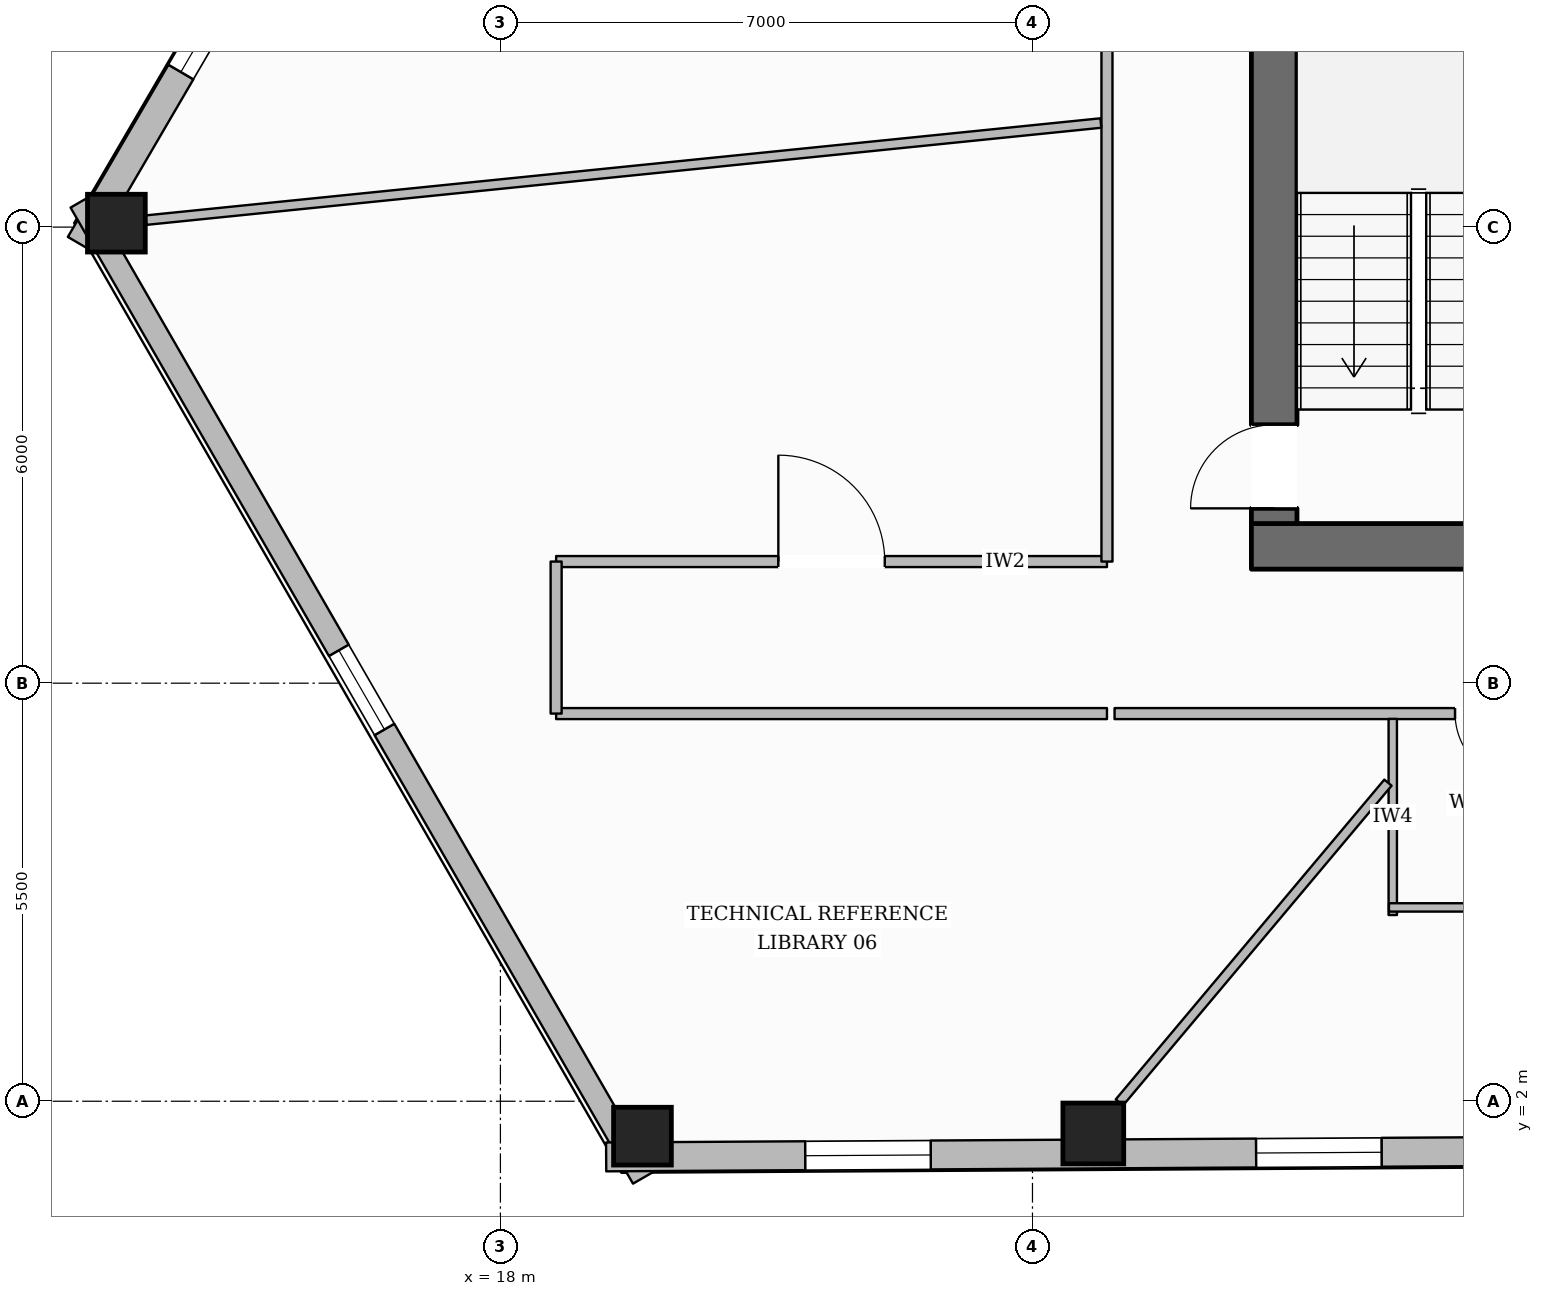
"""IFC4 building model, lengths in metres.
Left out: names, types, materials, properties, quantities, classifications, styles, units other than length and angle.
Written with IfcOpenShell. Run it as: python <this file> out.ifc"""

import sys

from ifc_helpers import new_model, si_unit, direction, frame, frame_2d, origin, origin_2d, place, context, subcontext, project, spatial, rectangle, hollow_rectangle, extrude, element, fill, save


model = new_model("IFC4")
c1 = context("Model", 3, precision=1e-05, world=origin(), true_north=direction((0.0, 1.0)))
c2 = subcontext(c1, "Body", "Model", "MODEL_VIEW")
j1 = project(units=[si_unit("LENGTHUNIT", "METRE"), si_unit("PLANEANGLEUNIT", "RADIAN")], contexts=[c1])
p1 = place(None, origin())
s1 = spatial("IfcSite", under=j1, at=p1, CompositionType="ELEMENT")
p2 = place(p1, origin())
s2 = spatial("IfcBuilding", under=s1, at=p2, CompositionType="ELEMENT")
p3 = place(p2, frame((0.0, 0.0, 71.45)))
s3 = spatial("IfcBuildingStorey", under=s2, at=p3, CompositionType="ELEMENT", Elevation=71.45)
p4 = place(p3, frame((27.88, 9.3, 0.0), z_axis=(0.0, 0.0, 1.0), x_axis=(1.0, 0.0, 0.0)))
e1 = element("IfcWall", 1, at=p4, inside=s3, PredefinedType="SOLIDWALL", context=c2, shape_type="SweptSolid", body=[
    extrude(rectangle(XDim=20.24, YDim=0.6, at=frame_2d((10.12, 0.0))), origin(), (0.0, 0.0, 1.0), 3.43),
])
p5 = place(p4, frame((10.62, 0.0, 0.0)))
e2 = element("IfcOpeningElement", 2, at=p5, cuts=e1, PredefinedType="OPENING", context=c2, shape_type="SweptSolid", body=[
    extrude(rectangle(XDim=1.4, YDim=2.2, at=frame_2d((0.7, 1.1))), frame((0.0, 0.31, 0.0), z_axis=(0.0, -1.0, 0.0), x_axis=(1.0, 0.0, 0.0)), (0.0, 0.0, 1.0), 0.62),
])
p6 = place(p3, frame((28.18, 9.6, 0.0), z_axis=(0.0, 0.0, 1.0), x_axis=(0.0, 1.0, 0.0)))
e3 = element("IfcWall", 3, at=p6, inside=s3, PredefinedType="SOLIDWALL", context=c2, shape_type="SweptSolid", body=[
    extrude(rectangle(XDim=13.0, YDim=0.6, at=frame_2d((6.5, 0.0))), origin(), (0.0, 0.0, 1.0), 3.43),
])
p7 = place(p6, frame((0.2, 0.0, 0.0)))
e4 = element("IfcOpeningElement", 4, at=p7, cuts=e3, PredefinedType="OPENING", context=c2, shape_type="SweptSolid", body=[
    extrude(rectangle(XDim=1.1, YDim=2.15, at=frame_2d((0.55, 1.075))), frame((0.0, 0.31, 0.0), z_axis=(0.0, -1.0, 0.0), x_axis=(1.0, 0.0, 0.0)), (0.0, 0.0, 1.0), 0.62),
])
p8 = place(p6, frame((8.4, 0.0, 0.0)))
e5 = element("IfcOpeningElement", 5, at=p8, cuts=e3, PredefinedType="OPENING", context=c2, shape_type="SweptSolid", body=[
    extrude(rectangle(XDim=0.9, YDim=2.1, at=frame_2d((0.45, 1.05))), frame((0.0, 0.31, 0.0), z_axis=(0.0, -1.0, 0.0), x_axis=(1.0, 0.0, 0.0)), (0.0, 0.0, 1.0), 0.62),
])
for number, where, z_axis, x_axis in (
    (6, (12.948, 13.552, 0.0), (0.0, 0.0, 1.0), (1.0, 0.0, 0.0)),
    (7, (19.869, 1.541, 0.0), (0.0, 0.0, 1.0), (1.0, 0.0, 0.0)),
):
    element("IfcColumn", number, at=place(p3, frame(where, z_axis=z_axis, x_axis=x_axis)), inside=s3, PredefinedType="COLUMN", context=c2, shape_type="SweptSolid", body=[
        extrude(hollow_rectangle(XDim=0.76, YDim=0.76, WallThickness=0.035, at=origin_2d()), origin(), (0.0, 0.0, 1.0), 3.43),
    ])
p9 = place(p3, frame((25.8, 1.576, 0.0), z_axis=(0.0, 0.0, 1.0), x_axis=(1.0, 0.0, 0.0)))
e8 = element("IfcColumn", 8, at=p9, inside=s3, PredefinedType="COLUMN", context=c2, shape_type="SweptSolid", body=[
    extrude(hollow_rectangle(XDim=0.8, YDim=0.8, WallThickness=0.036, at=origin_2d()), origin(), (0.0, 0.0, 1.0), 3.43),
])
p10 = place(p3, frame((12.473, 13.275, 0.0), z_axis=(0.0, 0.0, 1.0), x_axis=(0.504426765764, 0.863454479391, 0.0)))
e9 = element("IfcWall", 9, at=p10, inside=s3, PredefinedType="STANDARD", context=c2, shape_type="SweptSolid", body=[
    extrude(rectangle(XDim=36.594, YDim=0.38, at=frame_2d((18.297, 0.0))), origin(), (0.0, 0.0, 1.0), 2.81),
])
p11 = place(p10, frame((8.749, 0.0, 0.0)))
e10 = element("IfcOpeningElement", 10, at=p11, cuts=e9, PredefinedType="OPENING", context=c2, shape_type="SweptSolid", body=[
    extrude(rectangle(XDim=1.0, YDim=2.2, at=frame_2d((0.5, 1.1))), frame((0.0, 0.2, 0.0), z_axis=(0.0, -1.0, 0.0), x_axis=(1.0, 0.0, 0.0)), (0.0, 0.0, 1.0), 0.4),
])
p12 = place(p10, frame((32.326, 0.0, 0.55)))
e11 = element("IfcOpeningElement", 11, at=p12, cuts=e9, PredefinedType="OPENING", context=c2, shape_type="SweptSolid", body=[
    extrude(rectangle(XDim=1.65, YDim=1.6, at=frame_2d((0.825, 0.8))), frame((0.0, 0.2, 0.0), z_axis=(0.0, -1.0, 0.0), x_axis=(1.0, 0.0, 0.0)), (0.0, 0.0, 1.0), 0.4),
])
p13 = place(p10, frame((26.385, 0.0, 0.55)))
e12 = element("IfcOpeningElement", 12, at=p13, cuts=e9, PredefinedType="OPENING", context=c2, shape_type="SweptSolid", body=[
    extrude(rectangle(XDim=1.65, YDim=1.6, at=frame_2d((0.825, 0.8))), frame((0.0, 0.2, 0.0), z_axis=(0.0, -1.0, 0.0), x_axis=(1.0, 0.0, 0.0)), (0.0, 0.0, 1.0), 0.4),
])
p14 = place(p10, frame((20.445, 0.0, 0.55)))
e13 = element("IfcOpeningElement", 13, at=p14, cuts=e9, PredefinedType="OPENING", context=c2, shape_type="SweptSolid", body=[
    extrude(rectangle(XDim=1.65, YDim=1.6, at=frame_2d((0.825, 0.8))), frame((0.0, 0.2, 0.0), z_axis=(0.0, -1.0, 0.0), x_axis=(1.0, 0.0, 0.0)), (0.0, 0.0, 1.0), 0.4),
])
p15 = place(p10, frame((2.624, 0.0, 0.55)))
e14 = element("IfcOpeningElement", 14, at=p15, cuts=e9, PredefinedType="OPENING", context=c2, shape_type="SweptSolid", body=[
    extrude(rectangle(XDim=1.65, YDim=1.6, at=frame_2d((0.825, 0.8))), frame((0.0, 0.2, 0.0), z_axis=(0.0, -1.0, 0.0), x_axis=(1.0, 0.0, 0.0)), (0.0, 0.0, 1.0), 0.4),
])
p16 = place(p3, frame((19.874, 0.99, 0.0), z_axis=(0.0, 0.0, 1.0), x_axis=(-0.499265087694, 0.86644929004, 0.0)))
e15 = element("IfcWall", 15, at=p16, inside=s3, PredefinedType="STANDARD", context=c2, shape_type="SweptSolid", body=[
    extrude(rectangle(XDim=14.821, YDim=0.3, at=frame_2d((7.41, 0.0))), origin(), (0.0, 0.0, 1.0), 2.81),
])
p17 = place(p16, frame((6.81, 0.0, 0.65)))
e16 = element("IfcOpeningElement", 16, at=p17, cuts=e15, PredefinedType="OPENING", context=c2, shape_type="SweptSolid", body=[
    extrude(rectangle(XDim=1.2, YDim=1.55, at=frame_2d((0.6, 0.775))), frame((0.0, 0.16, 0.0), z_axis=(0.0, -1.0, 0.0), x_axis=(1.0, 0.0, 0.0)), (0.0, 0.0, 1.0), 0.32),
])
p18 = place(p3, frame((55.933, 1.486, 0.0), z_axis=(0.0, 0.0, 1.0), x_axis=(-0.999982241707, -0.005959552889, 0.0)))
e17 = element("IfcWall", 17, at=p18, inside=s3, PredefinedType="STANDARD", context=c2, shape_type="SweptSolid", body=[
    extrude(rectangle(XDim=36.542, YDim=0.38, at=frame_2d((18.271, 0.0))), origin(), (0.0, 0.0, 1.0), 2.81),
])
p19 = place(p18, frame((8.736, 0.0, 0.0)))
e18 = element("IfcOpeningElement", 18, at=p19, cuts=e17, PredefinedType="OPENING", context=c2, shape_type="SweptSolid", body=[
    extrude(rectangle(XDim=1.0, YDim=2.2, at=frame_2d((0.5, 1.1))), frame((0.0, 0.2, 0.0), z_axis=(0.0, -1.0, 0.0), x_axis=(1.0, 0.0, 0.0)), (0.0, 0.0, 1.0), 0.4),
])
p20 = place(p18, frame((32.272, 0.0, 0.55)))
e19 = element("IfcOpeningElement", 19, at=p20, cuts=e17, PredefinedType="OPENING", context=c2, shape_type="SweptSolid", body=[
    extrude(rectangle(XDim=1.65, YDim=1.6, at=frame_2d((0.825, 0.8))), frame((0.0, 0.2, 0.0), z_axis=(0.0, -1.0, 0.0), x_axis=(1.0, 0.0, 0.0)), (0.0, 0.0, 1.0), 0.4),
])
p21 = place(p18, frame((26.34, 0.0, 0.55)))
e20 = element("IfcOpeningElement", 20, at=p21, cuts=e17, PredefinedType="OPENING", context=c2, shape_type="SweptSolid", body=[
    extrude(rectangle(XDim=1.65, YDim=1.6, at=frame_2d((0.825, 0.8))), frame((0.0, 0.2, 0.0), z_axis=(0.0, -1.0, 0.0), x_axis=(1.0, 0.0, 0.0)), (0.0, 0.0, 1.0), 0.4),
])
p22 = place(p18, frame((20.409, 0.0, 0.55)))
e21 = element("IfcOpeningElement", 21, at=p22, cuts=e17, PredefinedType="OPENING", context=c2, shape_type="SweptSolid", body=[
    extrude(rectangle(XDim=1.65, YDim=1.6, at=frame_2d((0.825, 0.8))), frame((0.0, 0.2, 0.0), z_axis=(0.0, -1.0, 0.0), x_axis=(1.0, 0.0, 0.0)), (0.0, 0.0, 1.0), 0.4),
])
p23 = place(p18, frame((2.615, 0.0, 0.55)))
e22 = element("IfcOpeningElement", 22, at=p23, cuts=e17, PredefinedType="OPENING", context=c2, shape_type="SweptSolid", body=[
    extrude(rectangle(XDim=1.65, YDim=1.6, at=frame_2d((0.825, 0.8))), frame((0.0, 0.2, 0.0), z_axis=(0.0, -1.0, 0.0), x_axis=(1.0, 0.0, 0.0)), (0.0, 0.0, 1.0), 0.4),
])
p24 = place(p3, frame((18.733, 9.1, 0.0), z_axis=(0.0, 0.0, 1.0), x_axis=(1.0, 0.0, 0.0)))
e23 = element("IfcWall", 23, at=p24, inside=s3, PredefinedType="PARTITIONING", context=c2, shape_type="SweptSolid", body=[
    extrude(rectangle(XDim=7.247, YDim=0.145, at=frame_2d((3.624, 0.0))), origin(), (0.0, 0.0, 1.0), 3.43),
])
p25 = place(p24, frame((2.923, 0.0, 0.0)))
e24 = element("IfcOpeningElement", 24, at=p25, cuts=e23, PredefinedType="OPENING", context=c2, shape_type="SweptSolid", body=[
    extrude(rectangle(XDim=1.4, YDim=2.2, at=frame_2d((0.7, 1.1))), frame((0.0, 0.083, 0.0), z_axis=(0.0, -1.0, 0.0), x_axis=(1.0, 0.0, 0.0)), (0.0, 0.0, 1.0), 0.165),
])
p26 = place(p3, frame((25.98, 9.1, 0.0), z_axis=(0.0, 0.0, 1.0), x_axis=(0.0, 1.0, 0.0)))
e25 = element("IfcWall", 25, at=p26, inside=s3, PredefinedType="PARTITIONING", context=c2, shape_type="SweptSolid", body=[
    extrude(rectangle(XDim=16.0, YDim=0.145, at=frame_2d((8.0, 0.0))), origin(), (0.0, 0.0, 1.0), 3.118),
])
p27 = place(p26, frame((8.13, 0.0, 0.0)))
e26 = element("IfcOpeningElement", 26, at=p27, cuts=e25, PredefinedType="OPENING", context=c2, shape_type="SweptSolid", body=[
    extrude(rectangle(XDim=1.4, YDim=2.2, at=frame_2d((0.7, 1.1))), frame((0.0, 0.083, 0.0), z_axis=(0.0, -1.0, 0.0), x_axis=(1.0, 0.0, 0.0)), (0.0, 0.0, 1.0), 0.165),
])
p28 = place(p3, frame((49.92, 7.1, 0.0), z_axis=(0.0, 0.0, 1.0), x_axis=(-1.0, 0.0, 0.0)))
e27 = element("IfcWall", 27, at=p28, inside=s3, PredefinedType="PARTITIONING", context=c2, shape_type="SweptSolid", body=[
    extrude(rectangle(XDim=23.84, YDim=0.145, at=frame_2d((11.92, 0.0))), origin(), (0.0, 0.0, 1.0), 3.118),
])
p29 = place(p28, frame((18.48, 0.0, 0.0)))
e28 = element("IfcOpeningElement", 28, at=p29, cuts=e27, PredefinedType="OPENING", context=c2, shape_type="SweptSolid", body=[
    extrude(rectangle(XDim=0.88, YDim=2.1, at=frame_2d((0.44, 1.05))), frame((0.0, 0.083, 0.0), z_axis=(0.0, -1.0, 0.0), x_axis=(1.0, 0.0, 0.0)), (0.0, 0.0, 1.0), 0.165),
])
p30 = place(p28, frame((15.96, 0.0, 0.0)))
e29 = element("IfcOpeningElement", 29, at=p30, cuts=e27, PredefinedType="OPENING", context=c2, shape_type="SweptSolid", body=[
    extrude(rectangle(XDim=0.88, YDim=2.1, at=frame_2d((0.44, 1.05))), frame((0.0, 0.083, 0.0), z_axis=(0.0, -1.0, 0.0), x_axis=(1.0, 0.0, 0.0)), (0.0, 0.0, 1.0), 0.165),
])
p31 = place(p28, frame((13.5, 0.0, 0.0)))
e30 = element("IfcOpeningElement", 30, at=p31, cuts=e27, PredefinedType="OPENING", context=c2, shape_type="SweptSolid", body=[
    extrude(rectangle(XDim=0.96, YDim=2.1, at=frame_2d((0.48, 1.05))), frame((0.0, 0.083, 0.0), z_axis=(0.0, -1.0, 0.0), x_axis=(1.0, 0.0, 0.0)), (0.0, 0.0, 1.0), 0.165),
])
p32 = place(p28, frame((8.072, 0.0, 0.0)))
e31 = element("IfcOpeningElement", 31, at=p32, cuts=e27, PredefinedType="OPENING", context=c2, shape_type="SweptSolid", body=[
    extrude(rectangle(XDim=1.4, YDim=2.2, at=frame_2d((0.7, 1.1))), frame((0.0, 0.083, 0.0), z_axis=(0.0, -1.0, 0.0), x_axis=(1.0, 0.0, 0.0)), (0.0, 0.0, 1.0), 0.165),
])
p33 = place(p3, frame((25.98, 7.1, 0.0), z_axis=(0.0, 0.0, 1.0), x_axis=(-1.0, 0.0, 0.0)))
e32 = element("IfcWall", 32, at=p33, inside=s3, PredefinedType="PARTITIONING", context=c2, shape_type="SweptSolid", body=[
    extrude(rectangle(XDim=7.247, YDim=0.145, at=frame_2d((3.624, 0.0))), origin(), (0.0, 0.0, 1.0), 3.43),
])
p34 = place(p3, frame((18.733, 7.1, 0.0), z_axis=(0.0, 0.0, 1.0), x_axis=(0.0, 1.0, 0.0)))
e33 = element("IfcWall", 33, at=p34, inside=s3, PredefinedType="PARTITIONING", context=c2, shape_type="SweptSolid", body=[
    extrude(rectangle(XDim=2.0, YDim=0.145, at=frame_2d((1.0, 0.0))), origin(), (0.0, 0.0, 1.0), 3.43),
])
p35 = place(p3, frame((29.74, 4.45, 0.0), z_axis=(0.0, 0.0, 1.0), x_axis=(0.0, 1.0, 0.0)))
e34 = element("IfcWall", 34, at=p35, inside=s3, PredefinedType="PLUMBINGWALL", context=c2, shape_type="SweptSolid", body=[
    extrude(rectangle(XDim=2.58, YDim=0.11, at=frame_2d((1.29, 0.0))), origin(), (0.0, 0.0, 1.0), 3.43),
])
p36 = place(p3, frame((29.69, 4.55, 0.0), z_axis=(0.0, 0.0, 1.0), x_axis=(1.0, 0.0, 0.0)))
e35 = element("IfcWall", 35, at=p36, inside=s3, PredefinedType="PLUMBINGWALL", context=c2, shape_type="SweptSolid", body=[
    extrude(rectangle(XDim=7.46, YDim=0.11, at=frame_2d((3.73, 0.0))), origin(), (0.0, 0.0, 1.0), 3.43),
])
p37 = place(p3, frame((25.899, 14.869, 0.0), z_axis=(0.0, 0.0, 1.0), x_axis=(-0.99486751796, -0.101186074678, 0.0)))
e36 = element("IfcWall", 36, at=p37, inside=s3, PredefinedType="PARTITIONING", context=c2, shape_type="SweptSolid", body=[
    extrude(rectangle(XDim=12.628, YDim=0.125, at=frame_2d((6.314, 0.0))), origin(), (0.0, 0.0, 1.0), 2.897),
])
p38 = place(p3, frame((29.677, 6.191, 0.0), z_axis=(0.0, 0.0, 1.0), x_axis=(-0.64317332917, -0.76572062049, 0.0)))
e37 = element("IfcWall", 37, at=p38, inside=s3, PredefinedType="PARTITIONING", context=c2, shape_type="SweptSolid", body=[
    extrude(rectangle(XDim=5.495, YDim=0.125, at=frame_2d((2.747, 0.0))), origin(), (0.0, 0.0, 1.0), 3.43),
])
p39 = place(p15, origin())
e38 = element("IfcWindow", 38, at=p39, inside=s3, PartitioningType="SINGLE_PANEL", PredefinedType="WINDOW", context=c2, shape_type="SweptSolid", body=[
    extrude(rectangle(XDim=1.65, YDim=1.6, at=frame_2d((0.825, 0.8))), frame((0.0, 0.03, 0.0), z_axis=(0.0, -1.0, 0.0), x_axis=(1.0, 0.0, 0.0)), (0.0, 0.0, 1.0), 0.06),
])
fill(e14, e38)
p40 = place(p20, origin())
e39 = element("IfcWindow", 39, at=p40, inside=s3, PartitioningType="SINGLE_PANEL", PredefinedType="WINDOW", context=c2, shape_type="SweptSolid", body=[
    extrude(rectangle(XDim=1.65, YDim=1.6, at=frame_2d((0.825, 0.8))), frame((0.0, 0.03, 0.0), z_axis=(0.0, -1.0, 0.0), x_axis=(1.0, 0.0, 0.0)), (0.0, 0.0, 1.0), 0.06),
])
fill(e19, e39)
p41 = place(p21, origin())
e40 = element("IfcWindow", 40, at=p41, inside=s3, PartitioningType="SINGLE_PANEL", PredefinedType="WINDOW", context=c2, shape_type="SweptSolid", body=[
    extrude(rectangle(XDim=1.65, YDim=1.6, at=frame_2d((0.825, 0.8))), frame((0.0, 0.03, 0.0), z_axis=(0.0, -1.0, 0.0), x_axis=(1.0, 0.0, 0.0)), (0.0, 0.0, 1.0), 0.06),
])
fill(e20, e40)
p42 = place(p17, origin())
e41 = element("IfcWindow", 41, at=p42, inside=s3, PartitioningType="SINGLE_PANEL", PredefinedType="WINDOW", context=c2, shape_type="SweptSolid", body=[
    extrude(rectangle(XDim=1.2, YDim=1.55, at=frame_2d((0.6, 0.775))), frame((0.0, 0.03, 0.0), z_axis=(0.0, -1.0, 0.0), x_axis=(1.0, 0.0, 0.0)), (0.0, 0.0, 1.0), 0.06),
])
fill(e16, e41)
p43 = place(p7, origin())
e42 = element("IfcDoor", 42, at=p43, inside=s3, OperationType="SINGLE_SWING_LEFT", PredefinedType="DOOR", context=c2, shape_type="SweptSolid", body=[
    extrude(rectangle(XDim=1.1, YDim=2.15, at=frame_2d((0.55, 1.075))), frame((0.0, 0.025, 0.0), z_axis=(0.0, -1.0, 0.0), x_axis=(1.0, 0.0, 0.0)), (0.0, 0.0, 1.0), 0.05),
])
fill(e4, e42)
p44 = place(p29, origin())
e43 = element("IfcDoor", 43, at=p44, inside=s3, OperationType="SINGLE_SWING_LEFT", PredefinedType="DOOR", context=c2, shape_type="SweptSolid", body=[
    extrude(rectangle(XDim=0.88, YDim=2.1, at=frame_2d((0.44, 1.05))), frame((0.0, 0.025, 0.0), z_axis=(0.0, -1.0, 0.0), x_axis=(1.0, 0.0, 0.0)), (0.0, 0.0, 1.0), 0.05),
])
fill(e28, e43)
p45 = place(p25, origin())
e44 = element("IfcDoor", 44, at=p45, inside=s3, OperationType="SINGLE_SWING_LEFT", PredefinedType="DOOR", context=c2, shape_type="SweptSolid", body=[
    extrude(rectangle(XDim=1.4, YDim=2.2, at=frame_2d((0.7, 1.1))), frame((0.0, 0.025, 0.0), z_axis=(0.0, -1.0, 0.0), x_axis=(1.0, 0.0, 0.0)), (0.0, 0.0, 1.0), 0.05),
])
fill(e24, e44)
save(model, sys.argv[1])
